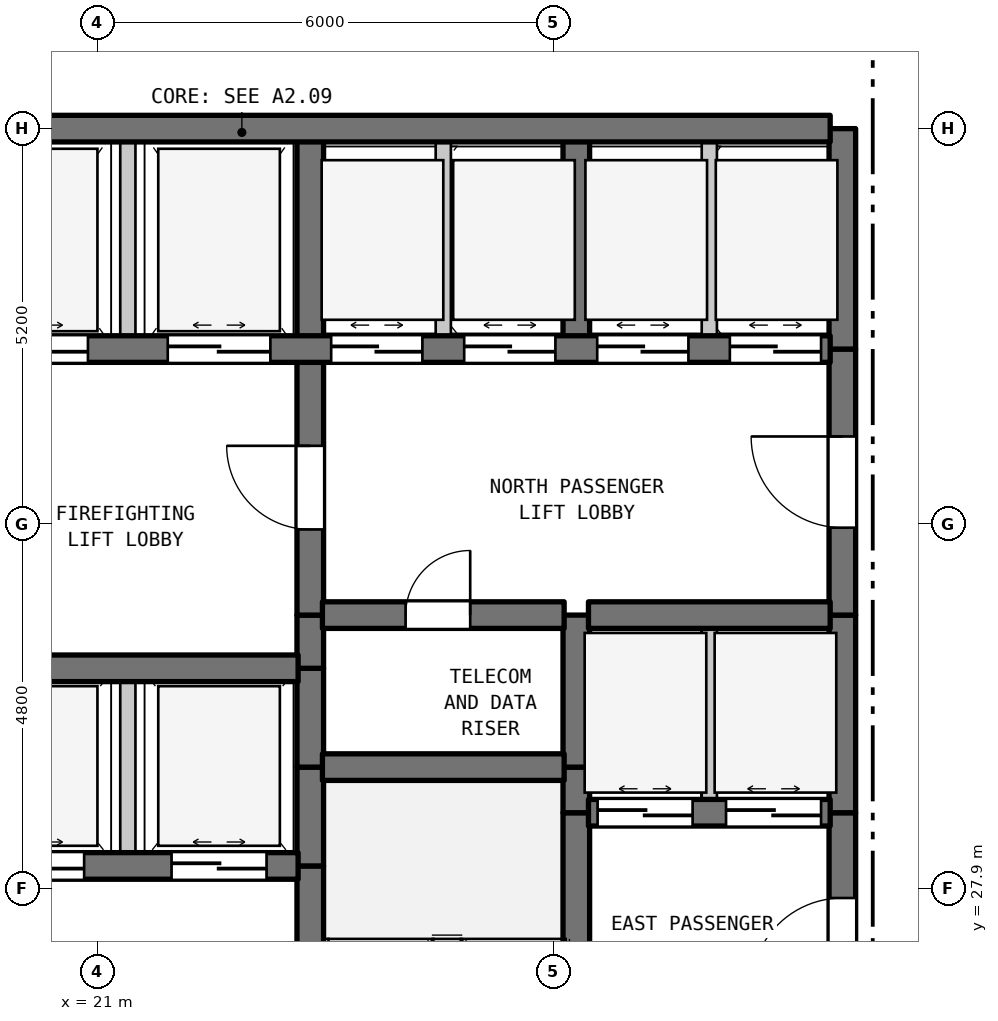
"""IFC4 building model, lengths in metres.
Left out: names, types, materials, properties, quantities, classifications, styles, units other than length and angle.
Written with IfcOpenShell. Run it as: python <this file> out.ifc"""

import sys

from ifc_helpers import new_model, si_unit, direction, frame, frame_2d, origin, place, context, subcontext, project, spatial, rectangle, extrude, element, fill, save


model = new_model("IFC4")
c1 = context("Model", 3, precision=1e-05, world=origin(), true_north=direction((0.0, 1.0)))
c2 = subcontext(c1, "Body", "Model", "MODEL_VIEW")
j1 = project(units=[si_unit("LENGTHUNIT", "METRE"), si_unit("PLANEANGLEUNIT", "RADIAN")], contexts=[c1])
p1 = place(None, origin())
s1 = spatial("IfcSite", under=j1, at=p1, CompositionType="ELEMENT")
p2 = place(p1, origin())
s2 = spatial("IfcBuilding", under=s1, at=p2, CompositionType="ELEMENT")
p3 = place(p2, frame((0.0, 0.0, 90.9)))
s3 = spatial("IfcBuildingStorey", under=s2, at=p3, CompositionType="ELEMENT", Elevation=90.9)
p4 = place(p3, frame((21.4, 28.2, 0.0), z_axis=(0.0, 0.0, 1.0), x_axis=(0.0, 1.0, 0.0)))
e1 = element("IfcWall", 1, at=p4, inside=s3, PredefinedType="STANDARD", context=c2, shape_type="SweptSolid", body=[
    extrude(rectangle(XDim=2.6, YDim=0.2, at=frame_2d((1.3, 0.0))), origin(), (0.0, 0.0, 1.0), 3.385),
])
p5 = place(p3, frame((21.4, 35.0, 0.0), z_axis=(0.0, 0.0, 1.0), x_axis=(0.0, 1.0, 0.0)))
e2 = element("IfcWall", 2, at=p5, inside=s3, PredefinedType="STANDARD", context=c2, shape_type="SweptSolid", body=[
    extrude(rectangle(XDim=2.9, YDim=0.2, at=frame_2d((1.45, 0.0))), origin(), (0.0, 0.0, 1.0), 3.385),
])
p6 = place(p3, frame((23.8, 22.7, 0.0), z_axis=(0.0, 0.0, 1.0), x_axis=(0.0, 1.0, 0.0)))
e3 = element("IfcWall", 3, at=p6, inside=s3, PredefinedType="SHEAR", context=c2, shape_type="SweptSolid", body=[
    extrude(rectangle(XDim=5.5, YDim=0.35, at=frame_2d((2.75, 0.0))), origin(), (0.0, 0.0, 1.0), 3.385),
])
p7 = place(p6, frame((0.235, 0.0, 0.0)))
e4 = element("IfcOpeningElement", 4, at=p7, cuts=e3, PredefinedType="OPENING", context=c2, shape_type="SweptSolid", body=[
    extrude(rectangle(XDim=1.1, YDim=2.15, at=frame_2d((0.55, 1.075))), frame((0.0, 0.185, 0.0), z_axis=(0.0, -1.0, 0.0), x_axis=(1.0, 0.0, 0.0)), (0.0, 0.0, 1.0), 0.37),
])
for number, where, z_axis, x_axis in (
    (5, (23.8, 28.2, 0.0), (0.0, 0.0, 1.0), (0.0, 1.0, 0.0)),
    (6, (23.8, 29.5, 0.0), (0.0, 0.0, 1.0), (0.0, 1.0, 0.0)),
):
    element("IfcWall", number, at=place(p3, frame(where, z_axis=z_axis, x_axis=x_axis)), inside=s3, PredefinedType="SHEAR", context=c2, shape_type="SweptSolid", body=[
        extrude(rectangle(XDim=1.3, YDim=0.35, at=frame_2d((0.65, 0.0))), origin(), (0.0, 0.0, 1.0), 3.385),
    ])
p8 = place(p3, frame((23.8, 30.8, 0.0), z_axis=(0.0, 0.0, 1.0), x_axis=(0.0, 1.0, 0.0)))
e7 = element("IfcWall", 7, at=p8, inside=s3, PredefinedType="SHEAR", context=c2, shape_type="SweptSolid", body=[
    extrude(rectangle(XDim=0.7, YDim=0.35, at=frame_2d((0.35, 0.0))), origin(), (0.0, 0.0, 1.0), 3.385),
])
p9 = place(p3, frame((23.8, 31.5, 0.0), z_axis=(0.0, 0.0, 1.0), x_axis=(0.0, 1.0, 0.0)))
e8 = element("IfcWall", 8, at=p9, inside=s3, PredefinedType="SHEAR", context=c2, shape_type="SweptSolid", body=[
    extrude(rectangle(XDim=3.5, YDim=0.35, at=frame_2d((1.75, 0.0))), origin(), (0.0, 0.0, 1.0), 3.385),
])
p10 = place(p9, frame((1.127, 0.0, 0.0)))
e9 = element("IfcOpeningElement", 9, at=p10, cuts=e8, PredefinedType="OPENING", context=c2, shape_type="SweptSolid", body=[
    extrude(rectangle(XDim=1.1, YDim=2.15, at=frame_2d((0.55, 1.075))), frame((0.0, 0.185, 0.0), z_axis=(0.0, -1.0, 0.0), x_axis=(1.0, 0.0, 0.0)), (0.0, 0.0, 1.0), 0.37),
])
p11 = place(p3, frame((23.8, 35.0, 0.0), z_axis=(0.0, 0.0, 1.0), x_axis=(0.0, 1.0, 0.0)))
e10 = element("IfcWall", 10, at=p11, inside=s3, PredefinedType="SHEAR", context=c2, shape_type="SweptSolid", body=[
    extrude(rectangle(XDim=2.9, YDim=0.35, at=frame_2d((1.45, 0.0))), origin(), (0.0, 0.0, 1.0), 3.385),
])
p12 = place(p3, frame((25.55, 35.0, 0.0), z_axis=(0.0, 0.0, 1.0), x_axis=(0.0, 1.0, 0.0)))
e11 = element("IfcWall", 11, at=p12, inside=s3, PredefinedType="STANDARD", context=c2, shape_type="SweptSolid", body=[
    extrude(rectangle(XDim=2.9, YDim=0.2, at=frame_2d((1.45, 0.0))), origin(), (0.0, 0.0, 1.0), 3.385),
])
p13 = place(p3, frame((27.3, 25.6, 0.0), z_axis=(0.0, 0.0, 1.0), x_axis=(0.0, 1.0, 0.0)))
e12 = element("IfcWall", 12, at=p13, inside=s3, PredefinedType="SHEAR", context=c2, shape_type="SweptSolid", body=[
    extrude(rectangle(XDim=3.3, YDim=0.35, at=frame_2d((1.65, 0.0))), origin(), (0.0, 0.0, 1.0), 3.385),
])
p14 = place(p3, frame((27.3, 28.9, 0.0), z_axis=(0.0, 0.0, 1.0), x_axis=(0.0, 1.0, 0.0)))
e13 = element("IfcWall", 13, at=p14, inside=s3, PredefinedType="SHEAR", context=c2, shape_type="SweptSolid", body=[
    extrude(rectangle(XDim=0.6, YDim=0.35, at=frame_2d((0.3, 0.0))), origin(), (0.0, 0.0, 1.0), 3.385),
])
p15 = place(p3, frame((27.3, 29.5, 0.0), z_axis=(0.0, 0.0, 1.0), x_axis=(0.0, 1.0, 0.0)))
e14 = element("IfcWall", 14, at=p15, inside=s3, PredefinedType="SHEAR", context=c2, shape_type="SweptSolid", body=[
    extrude(rectangle(XDim=2.0, YDim=0.35, at=frame_2d((1.0, 0.0))), origin(), (0.0, 0.0, 1.0), 3.385),
])
p16 = place(p3, frame((27.3, 35.0, 0.0), z_axis=(0.0, 0.0, 1.0), x_axis=(0.0, 1.0, 0.0)))
e15 = element("IfcWall", 15, at=p16, inside=s3, PredefinedType="SHEAR", context=c2, shape_type="SweptSolid", body=[
    extrude(rectangle(XDim=2.9, YDim=0.35, at=frame_2d((1.45, 0.0))), origin(), (0.0, 0.0, 1.0), 3.385),
])
p17 = place(p3, frame((29.05, 28.9, 0.0), z_axis=(0.0, 0.0, 1.0), x_axis=(0.0, 1.0, 0.0)))
e16 = element("IfcWall", 16, at=p17, inside=s3, PredefinedType="STANDARD", context=c2, shape_type="SweptSolid", body=[
    extrude(rectangle(XDim=2.6, YDim=0.2, at=frame_2d((1.3, 0.0))), origin(), (0.0, 0.0, 1.0), 3.385),
])
p18 = place(p3, frame((29.05, 35.0, 0.0), z_axis=(0.0, 0.0, 1.0), x_axis=(0.0, 1.0, 0.0)))
e17 = element("IfcWall", 17, at=p18, inside=s3, PredefinedType="STANDARD", context=c2, shape_type="SweptSolid", body=[
    extrude(rectangle(XDim=2.9, YDim=0.2, at=frame_2d((1.45, 0.0))), origin(), (0.0, 0.0, 1.0), 3.385),
])
p19 = place(p3, frame((30.8, 25.6, 0.0), z_axis=(0.0, 0.0, 1.0), x_axis=(0.0, 1.0, 0.0)))
e18 = element("IfcWall", 18, at=p19, inside=s3, PredefinedType="SHEAR", context=c2, shape_type="SweptSolid", body=[
    extrude(rectangle(XDim=3.3, YDim=0.35, at=frame_2d((1.65, 0.0))), origin(), (0.0, 0.0, 1.0), 3.385),
])
p20 = place(p19, frame((0.978, 0.0, 0.0)))
e19 = element("IfcOpeningElement", 19, at=p20, cuts=e18, PredefinedType="OPENING", context=c2, shape_type="SweptSolid", body=[
    extrude(rectangle(XDim=1.2, YDim=2.2, at=frame_2d((0.6, 1.1))), frame((0.0, 0.185, 0.0), z_axis=(0.0, -1.0, 0.0), x_axis=(1.0, 0.0, 0.0)), (0.0, 0.0, 1.0), 0.37),
])
p21 = place(p3, frame((30.8, 28.9, 0.0), z_axis=(0.0, 0.0, 1.0), x_axis=(0.0, 1.0, 0.0)))
e20 = element("IfcWall", 20, at=p21, inside=s3, PredefinedType="SHEAR", context=c2, shape_type="SweptSolid", body=[
    extrude(rectangle(XDim=2.6, YDim=0.35, at=frame_2d((1.3, 0.0))), origin(), (0.0, 0.0, 1.0), 3.385),
])
p22 = place(p3, frame((30.8, 31.5, 0.0), z_axis=(0.0, 0.0, 1.0), x_axis=(0.0, 1.0, 0.0)))
e21 = element("IfcWall", 21, at=p22, inside=s3, PredefinedType="SHEAR", context=c2, shape_type="SweptSolid", body=[
    extrude(rectangle(XDim=3.5, YDim=0.35, at=frame_2d((1.75, 0.0))), origin(), (0.0, 0.0, 1.0), 3.385),
])
p23 = place(p22, frame((1.15, 0.0, 0.0)))
e22 = element("IfcOpeningElement", 22, at=p23, cuts=e21, PredefinedType="OPENING", context=c2, shape_type="SweptSolid", body=[
    extrude(rectangle(XDim=1.2, YDim=2.2, at=frame_2d((0.6, 1.1))), frame((0.0, 0.185, 0.0), z_axis=(0.0, -1.0, 0.0), x_axis=(1.0, 0.0, 0.0)), (0.0, 0.0, 1.0), 0.37),
])
p24 = place(p3, frame((30.8, 35.0, 0.0), z_axis=(0.0, 0.0, 1.0), x_axis=(0.0, 1.0, 0.0)))
e23 = element("IfcWall", 23, at=p24, inside=s3, PredefinedType="SHEAR", context=c2, shape_type="SweptSolid", body=[
    extrude(rectangle(XDim=2.9, YDim=0.35, at=frame_2d((1.45, 0.0))), origin(), (0.0, 0.0, 1.0), 3.385),
])
p25 = place(p3, frame((19.16, 28.2, 0.0), z_axis=(0.0, 0.0, 1.0), x_axis=(1.0, 0.0, 0.0)))
e24 = element("IfcWall", 24, at=p25, inside=s3, PredefinedType="SHEAR", context=c2, shape_type="SweptSolid", body=[
    extrude(rectangle(XDim=4.48, YDim=0.35, at=frame_2d((2.24, 0.0))), origin(), (0.0, 0.0, 1.0), 3.385),
])
p26 = place(p25, frame((0.415, 0.0, 0.0)))
e25 = element("IfcOpeningElement", 25, at=p26, cuts=e24, PredefinedType="OPENING", context=c2, shape_type="SweptSolid", body=[
    extrude(rectangle(XDim=1.25, YDim=2.2, at=frame_2d((0.625, 1.1))), frame((0.0, 0.185, 0.0), z_axis=(0.0, -1.0, 0.0), x_axis=(1.0, 0.0, 0.0)), (0.0, 0.0, 1.0), 0.37),
])
p27 = place(p25, frame((2.815, 0.0, 0.0)))
e26 = element("IfcOpeningElement", 26, at=p27, cuts=e24, PredefinedType="OPENING", context=c2, shape_type="SweptSolid", body=[
    extrude(rectangle(XDim=1.25, YDim=2.2, at=frame_2d((0.625, 1.1))), frame((0.0, 0.185, 0.0), z_axis=(0.0, -1.0, 0.0), x_axis=(1.0, 0.0, 0.0)), (0.0, 0.0, 1.0), 0.37),
])
p28 = place(p3, frame((27.46, 28.9, 0.0), z_axis=(0.0, 0.0, 1.0), x_axis=(1.0, 0.0, 0.0)))
e27 = element("IfcWall", 27, at=p28, inside=s3, PredefinedType="SHEAR", context=c2, shape_type="SweptSolid", body=[
    extrude(rectangle(XDim=3.18, YDim=0.35, at=frame_2d((1.59, 0.0))), origin(), (0.0, 0.0, 1.0), 3.385),
])
p29 = place(p28, frame((0.12, 0.0, 0.0)))
e28 = element("IfcOpeningElement", 28, at=p29, cuts=e27, PredefinedType="OPENING", context=c2, shape_type="SweptSolid", body=[
    extrude(rectangle(XDim=1.25, YDim=2.2, at=frame_2d((0.625, 1.1))), frame((0.0, 0.185, 0.0), z_axis=(0.0, -1.0, 0.0), x_axis=(1.0, 0.0, 0.0)), (0.0, 0.0, 1.0), 0.37),
])
p30 = place(p28, frame((1.81, 0.0, 0.0)))
e29 = element("IfcOpeningElement", 29, at=p30, cuts=e27, PredefinedType="OPENING", context=c2, shape_type="SweptSolid", body=[
    extrude(rectangle(XDim=1.25, YDim=2.2, at=frame_2d((0.625, 1.1))), frame((0.0, 0.185, 0.0), z_axis=(0.0, -1.0, 0.0), x_axis=(1.0, 0.0, 0.0)), (0.0, 0.0, 1.0), 0.37),
])
p31 = place(p3, frame((23.96, 29.5, 0.0), z_axis=(0.0, 0.0, 1.0), x_axis=(1.0, 0.0, 0.0)))
e30 = element("IfcWall", 30, at=p31, inside=s3, PredefinedType="SHEAR", context=c2, shape_type="SweptSolid", body=[
    extrude(rectangle(XDim=3.18, YDim=0.35, at=frame_2d((1.59, 0.0))), origin(), (0.0, 0.0, 1.0), 3.385),
])
p32 = place(p3, frame((19.16, 30.8, 0.0), z_axis=(0.0, 0.0, 1.0), x_axis=(1.0, 0.0, 0.0)))
e31 = element("IfcWall", 31, at=p32, inside=s3, PredefinedType="SHEAR", context=c2, shape_type="SweptSolid", body=[
    extrude(rectangle(XDim=4.48, YDim=0.35, at=frame_2d((2.24, 0.0))), origin(), (0.0, 0.0, 1.0), 3.385),
])
p33 = place(p3, frame((23.96, 31.5, 0.0), z_axis=(0.0, 0.0, 1.0), x_axis=(1.0, 0.0, 0.0)))
e32 = element("IfcWall", 32, at=p33, inside=s3, PredefinedType="SHEAR", context=c2, shape_type="SweptSolid", body=[
    extrude(rectangle(XDim=3.18, YDim=0.35, at=frame_2d((1.59, 0.0))), origin(), (0.0, 0.0, 1.0), 3.385),
])
p34 = place(p33, frame((1.094, 0.0, 0.0)))
e33 = element("IfcOpeningElement", 33, at=p34, cuts=e32, PredefinedType="OPENING", context=c2, shape_type="SweptSolid", body=[
    extrude(rectangle(XDim=0.85, YDim=2.1, at=frame_2d((0.425, 1.05))), frame((0.0, 0.185, 0.0), z_axis=(0.0, -1.0, 0.0), x_axis=(1.0, 0.0, 0.0)), (0.0, 0.0, 1.0), 0.37),
])
p35 = place(p3, frame((27.46, 31.5, 0.0), z_axis=(0.0, 0.0, 1.0), x_axis=(1.0, 0.0, 0.0)))
e34 = element("IfcWall", 34, at=p35, inside=s3, PredefinedType="SHEAR", context=c2, shape_type="SweptSolid", body=[
    extrude(rectangle(XDim=3.18, YDim=0.35, at=frame_2d((1.59, 0.0))), origin(), (0.0, 0.0, 1.0), 3.385),
])
p36 = place(p3, frame((19.16, 35.0, 0.0), z_axis=(0.0, 0.0, 1.0), x_axis=(1.0, 0.0, 0.0)))
e35 = element("IfcWall", 35, at=p36, inside=s3, PredefinedType="SHEAR", context=c2, shape_type="SweptSolid", body=[
    extrude(rectangle(XDim=11.48, YDim=0.35, at=frame_2d((5.74, 0.0))), origin(), (0.0, 0.0, 1.0), 3.385),
])
p37 = place(p36, frame((0.365, 0.0, 0.0)))
e36 = element("IfcOpeningElement", 36, at=p37, cuts=e35, PredefinedType="OPENING", context=c2, shape_type="SweptSolid", body=[
    extrude(rectangle(XDim=1.35, YDim=2.2, at=frame_2d((0.675, 1.1))), frame((0.0, 0.185, 0.0), z_axis=(0.0, -1.0, 0.0), x_axis=(1.0, 0.0, 0.0)), (0.0, 0.0, 1.0), 0.37),
])
p38 = place(p36, frame((2.765, 0.0, 0.0)))
e37 = element("IfcOpeningElement", 37, at=p38, cuts=e35, PredefinedType="OPENING", context=c2, shape_type="SweptSolid", body=[
    extrude(rectangle(XDim=1.35, YDim=2.2, at=frame_2d((0.675, 1.1))), frame((0.0, 0.185, 0.0), z_axis=(0.0, -1.0, 0.0), x_axis=(1.0, 0.0, 0.0)), (0.0, 0.0, 1.0), 0.37),
])
p39 = place(p36, frame((4.915, 0.0, 0.0)))
e38 = element("IfcOpeningElement", 38, at=p39, cuts=e35, PredefinedType="OPENING", context=c2, shape_type="SweptSolid", body=[
    extrude(rectangle(XDim=1.2, YDim=2.2, at=frame_2d((0.6, 1.1))), frame((0.0, 0.185, 0.0), z_axis=(0.0, -1.0, 0.0), x_axis=(1.0, 0.0, 0.0)), (0.0, 0.0, 1.0), 0.37),
])
p40 = place(p36, frame((6.665, 0.0, 0.0)))
e39 = element("IfcOpeningElement", 39, at=p40, cuts=e35, PredefinedType="OPENING", context=c2, shape_type="SweptSolid", body=[
    extrude(rectangle(XDim=1.2, YDim=2.2, at=frame_2d((0.6, 1.1))), frame((0.0, 0.185, 0.0), z_axis=(0.0, -1.0, 0.0), x_axis=(1.0, 0.0, 0.0)), (0.0, 0.0, 1.0), 0.37),
])
p41 = place(p36, frame((8.415, 0.0, 0.0)))
e40 = element("IfcOpeningElement", 40, at=p41, cuts=e35, PredefinedType="OPENING", context=c2, shape_type="SweptSolid", body=[
    extrude(rectangle(XDim=1.2, YDim=2.2, at=frame_2d((0.6, 1.1))), frame((0.0, 0.185, 0.0), z_axis=(0.0, -1.0, 0.0), x_axis=(1.0, 0.0, 0.0)), (0.0, 0.0, 1.0), 0.37),
])
p42 = place(p36, frame((10.16, 0.0, 0.0)))
e41 = element("IfcOpeningElement", 41, at=p42, cuts=e35, PredefinedType="OPENING", context=c2, shape_type="SweptSolid", body=[
    extrude(rectangle(XDim=1.2, YDim=2.2, at=frame_2d((0.6, 1.1))), frame((0.0, 0.185, 0.0), z_axis=(0.0, -1.0, 0.0), x_axis=(1.0, 0.0, 0.0)), (0.0, 0.0, 1.0), 0.37),
])
p43 = place(p3, frame((19.16, 37.9, 0.0), z_axis=(0.0, 0.0, 1.0), x_axis=(1.0, 0.0, 0.0)))
e42 = element("IfcWall", 42, at=p43, inside=s3, PredefinedType="SHEAR", context=c2, shape_type="SweptSolid", body=[
    extrude(rectangle(XDim=11.48, YDim=0.35, at=frame_2d((5.74, 0.0))), origin(), (0.0, 0.0, 1.0), 3.385),
])
p44 = place(p10, origin())
e43 = element("IfcDoor", 43, at=p44, inside=s3, OperationType="SINGLE_SWING_RIGHT", PredefinedType="DOOR", context=c2, shape_type="SweptSolid", body=[
    extrude(rectangle(XDim=1.1, YDim=2.15, at=frame_2d((0.55, 1.075))), frame((0.0, 0.025, 0.0), z_axis=(0.0, -1.0, 0.0), x_axis=(1.0, 0.0, 0.0)), (0.0, 0.0, 1.0), 0.05),
])
fill(e9, e43)
p45 = place(p20, origin())
e44 = element("IfcDoor", 44, at=p45, inside=s3, OperationType="SINGLE_SWING_LEFT", PredefinedType="DOOR", context=c2, shape_type="SweptSolid", body=[
    extrude(rectangle(XDim=1.2, YDim=2.2, at=frame_2d((0.6, 1.1))), frame((0.0, 0.025, 0.0), z_axis=(0.0, -1.0, 0.0), x_axis=(1.0, 0.0, 0.0)), (0.0, 0.0, 1.0), 0.05),
])
fill(e19, e44)
p46 = place(p23, origin())
e45 = element("IfcDoor", 45, at=p46, inside=s3, OperationType="SINGLE_SWING_RIGHT", PredefinedType="DOOR", context=c2, shape_type="SweptSolid", body=[
    extrude(rectangle(XDim=1.2, YDim=2.2, at=frame_2d((0.6, 1.1))), frame((0.0, 0.025, 0.0), z_axis=(0.0, -1.0, 0.0), x_axis=(1.0, 0.0, 0.0)), (0.0, 0.0, 1.0), 0.05),
])
fill(e22, e45)
p47 = place(p26, origin())
e46 = element("IfcDoor", 46, at=p47, inside=s3, OperationType="DOUBLE_DOOR_SLIDING", PredefinedType="DOOR", context=c2, shape_type="SweptSolid", body=[
    extrude(rectangle(XDim=1.25, YDim=2.2, at=frame_2d((0.625, 1.1))), frame((0.0, 0.025, 0.0), z_axis=(0.0, -1.0, 0.0), x_axis=(1.0, 0.0, 0.0)), (0.0, 0.0, 1.0), 0.05),
])
fill(e25, e46)
p48 = place(p27, origin())
e47 = element("IfcDoor", 47, at=p48, inside=s3, OperationType="DOUBLE_DOOR_SLIDING", PredefinedType="DOOR", context=c2, shape_type="SweptSolid", body=[
    extrude(rectangle(XDim=1.25, YDim=2.2, at=frame_2d((0.625, 1.1))), frame((0.0, 0.025, 0.0), z_axis=(0.0, -1.0, 0.0), x_axis=(1.0, 0.0, 0.0)), (0.0, 0.0, 1.0), 0.05),
])
fill(e26, e47)
p49 = place(p29, origin())
e48 = element("IfcDoor", 48, at=p49, inside=s3, OperationType="DOUBLE_DOOR_SLIDING", PredefinedType="DOOR", context=c2, shape_type="SweptSolid", body=[
    extrude(rectangle(XDim=1.25, YDim=2.2, at=frame_2d((0.625, 1.1))), frame((0.0, 0.025, 0.0), z_axis=(0.0, -1.0, 0.0), x_axis=(1.0, 0.0, 0.0)), (0.0, 0.0, 1.0), 0.05),
])
fill(e28, e48)
p50 = place(p30, origin())
e49 = element("IfcDoor", 49, at=p50, inside=s3, OperationType="DOUBLE_DOOR_SLIDING", PredefinedType="DOOR", context=c2, shape_type="SweptSolid", body=[
    extrude(rectangle(XDim=1.25, YDim=2.2, at=frame_2d((0.625, 1.1))), frame((0.0, 0.025, 0.0), z_axis=(0.0, -1.0, 0.0), x_axis=(1.0, 0.0, 0.0)), (0.0, 0.0, 1.0), 0.05),
])
fill(e29, e49)
p51 = place(p34, origin())
e50 = element("IfcDoor", 50, at=p51, inside=s3, OperationType="SINGLE_SWING_RIGHT", PredefinedType="DOOR", context=c2, shape_type="SweptSolid", body=[
    extrude(rectangle(XDim=0.85, YDim=2.1, at=frame_2d((0.425, 1.05))), frame((0.0, 0.025, 0.0), z_axis=(0.0, -1.0, 0.0), x_axis=(1.0, 0.0, 0.0)), (0.0, 0.0, 1.0), 0.05),
])
fill(e33, e50)
p52 = place(p37, origin())
e51 = element("IfcDoor", 51, at=p52, inside=s3, OperationType="DOUBLE_DOOR_SLIDING", PredefinedType="DOOR", context=c2, shape_type="SweptSolid", body=[
    extrude(rectangle(XDim=1.35, YDim=2.2, at=frame_2d((0.675, 1.1))), frame((0.0, 0.025, 0.0), z_axis=(0.0, -1.0, 0.0), x_axis=(1.0, 0.0, 0.0)), (0.0, 0.0, 1.0), 0.05),
])
fill(e36, e51)
p53 = place(p38, origin())
e52 = element("IfcDoor", 52, at=p53, inside=s3, OperationType="DOUBLE_DOOR_SLIDING", PredefinedType="DOOR", context=c2, shape_type="SweptSolid", body=[
    extrude(rectangle(XDim=1.35, YDim=2.2, at=frame_2d((0.675, 1.1))), frame((0.0, 0.025, 0.0), z_axis=(0.0, -1.0, 0.0), x_axis=(1.0, 0.0, 0.0)), (0.0, 0.0, 1.0), 0.05),
])
fill(e37, e52)
p54 = place(p39, origin())
e53 = element("IfcDoor", 53, at=p54, inside=s3, OperationType="DOUBLE_DOOR_SLIDING", PredefinedType="DOOR", context=c2, shape_type="SweptSolid", body=[
    extrude(rectangle(XDim=1.2, YDim=2.2, at=frame_2d((0.6, 1.1))), frame((0.0, 0.025, 0.0), z_axis=(0.0, -1.0, 0.0), x_axis=(1.0, 0.0, 0.0)), (0.0, 0.0, 1.0), 0.05),
])
fill(e38, e53)
p55 = place(p40, origin())
e54 = element("IfcDoor", 54, at=p55, inside=s3, OperationType="DOUBLE_DOOR_SLIDING", PredefinedType="DOOR", context=c2, shape_type="SweptSolid", body=[
    extrude(rectangle(XDim=1.2, YDim=2.2, at=frame_2d((0.6, 1.1))), frame((0.0, 0.025, 0.0), z_axis=(0.0, -1.0, 0.0), x_axis=(1.0, 0.0, 0.0)), (0.0, 0.0, 1.0), 0.05),
])
fill(e39, e54)
p56 = place(p41, origin())
e55 = element("IfcDoor", 55, at=p56, inside=s3, OperationType="DOUBLE_DOOR_SLIDING", PredefinedType="DOOR", context=c2, shape_type="SweptSolid", body=[
    extrude(rectangle(XDim=1.2, YDim=2.2, at=frame_2d((0.6, 1.1))), frame((0.0, 0.025, 0.0), z_axis=(0.0, -1.0, 0.0), x_axis=(1.0, 0.0, 0.0)), (0.0, 0.0, 1.0), 0.05),
])
fill(e40, e55)
p57 = place(p42, origin())
e56 = element("IfcDoor", 56, at=p57, inside=s3, OperationType="DOUBLE_DOOR_SLIDING", PredefinedType="DOOR", context=c2, shape_type="SweptSolid", body=[
    extrude(rectangle(XDim=1.2, YDim=2.2, at=frame_2d((0.6, 1.1))), frame((0.0, 0.025, 0.0), z_axis=(0.0, -1.0, 0.0), x_axis=(1.0, 0.0, 0.0)), (0.0, 0.0, 1.0), 0.05),
])
fill(e41, e56)
save(model, sys.argv[1])
